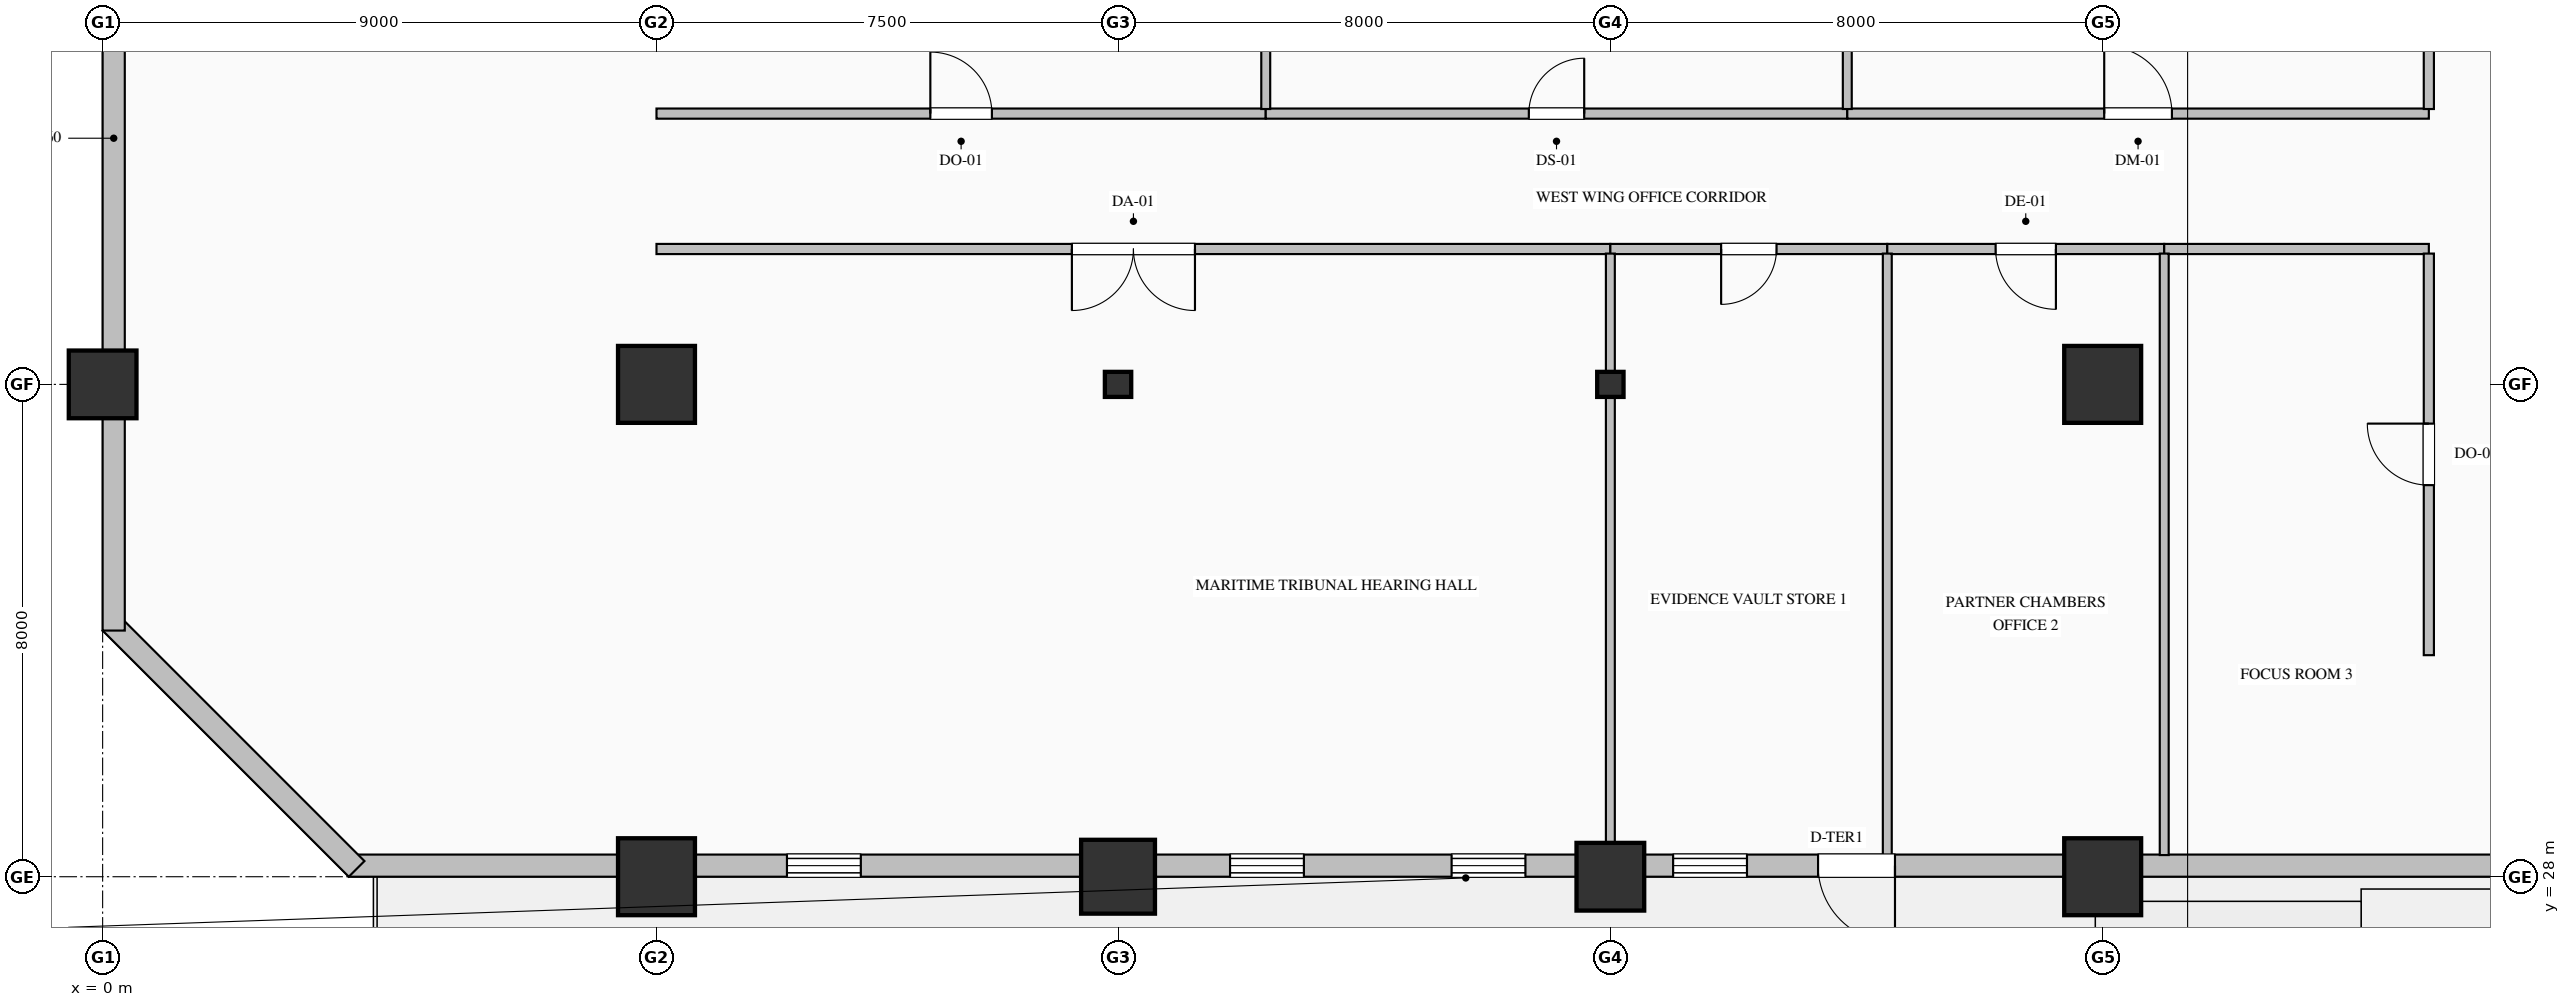
"""IFC4 building model, lengths in metres.
Left out: names, types, materials, properties, quantities, classifications, styles, units other than length and angle.
Written with IfcOpenShell. Run it as: python <this file> out.ifc"""

import sys

from ifc_helpers import new_model, si_unit, direction, frame, frame_2d, origin, origin_2d, place, context, subcontext, project, spatial, rectangle, hollow_rectangle, hollow_circle, i_section, extrude, element, fill, save


model = new_model("IFC4")
c1 = context("Model", 3, precision=1e-05, world=origin(), true_north=direction((0.0, 1.0)))
c2 = subcontext(c1, "Body", "Model", "MODEL_VIEW")
j1 = project(units=[si_unit("LENGTHUNIT", "METRE"), si_unit("PLANEANGLEUNIT", "RADIAN")], contexts=[c1])
p1 = place(None, origin())
s1 = spatial("IfcSite", under=j1, at=p1, CompositionType="ELEMENT")
p2 = place(p1, origin())
s2 = spatial("IfcBuilding", under=s1, at=p2, CompositionType="ELEMENT")
p3 = place(p2, frame((0.0, 0.0, 100.2)))
s3 = spatial("IfcBuildingStorey", under=s2, at=p3, CompositionType="ELEMENT", Elevation=100.2)
p4 = place(p3, frame((0.0, 36.0, 0.0), z_axis=(0.0, 0.0, 1.0), x_axis=(1.0, 0.0, 0.0)))
e1 = element("IfcColumn", 1, at=p4, inside=s3, PredefinedType="COLUMN", context=c2, shape_type="SweptSolid", body=[
    extrude(hollow_rectangle(XDim=1.1, YDim=1.1, WallThickness=0.04, at=origin_2d()), origin(), (0.0, 0.0, 1.0), 4.0),
])
for number, where, z_axis, x_axis in (
    (2, (9.0, 28.0, 0.0), (0.0, 0.0, 1.0), (1.0, 0.0, 0.0)),
    (3, (9.0, 36.0, 0.0), (0.0, 0.0, 1.0), (1.0, 0.0, 0.0)),
):
    element("IfcColumn", number, at=place(p3, frame(where, z_axis=z_axis, x_axis=x_axis)), inside=s3, PredefinedType="COLUMN", context=c2, shape_type="SweptSolid", body=[
        extrude(hollow_rectangle(XDim=1.25, YDim=1.25, WallThickness=0.045, at=origin_2d()), origin(), (0.0, 0.0, 1.0), 4.0),
    ])
p5 = place(p3, frame((16.5, 28.0, 0.0), z_axis=(0.0, 0.0, 1.0), x_axis=(1.0, 0.0, 0.0)))
e4 = element("IfcColumn", 4, at=p5, inside=s3, PredefinedType="COLUMN", context=c2, shape_type="SweptSolid", body=[
    extrude(hollow_circle(Radius=0.6, WallThickness=0.04, at=origin_2d()), origin(), (0.0, 0.0, 1.0), 4.0),
])
p6 = place(p3, frame((16.5, 36.0, 0.0), z_axis=(0.0, 0.0, 1.0), x_axis=(1.0, 0.0, 0.0)))
e5 = element("IfcColumn", 5, at=p6, inside=s3, PredefinedType="COLUMN", context=c2, shape_type="SweptSolid", body=[
    extrude(i_section(OverallWidth=0.407, OverallDepth=0.428, WebThickness=0.02, FlangeThickness=0.035, FilletRadius=0.022, at=origin_2d()), origin(), (0.0, 0.0, 1.0), 4.0),
])
p7 = place(p3, frame((24.5, 28.0, 0.0), z_axis=(0.0, 0.0, 1.0), x_axis=(1.0, 0.0, 0.0)))
e6 = element("IfcColumn", 6, at=p7, inside=s3, PredefinedType="COLUMN", context=c2, shape_type="SweptSolid", body=[
    extrude(hollow_rectangle(XDim=1.1, YDim=1.1, WallThickness=0.04, at=origin_2d()), origin(), (0.0, 0.0, 1.0), 4.0),
])
p8 = place(p3, frame((24.5, 36.0, 0.0), z_axis=(0.0, 0.0, 1.0), x_axis=(1.0, 0.0, 0.0)))
e7 = element("IfcColumn", 7, at=p8, inside=s3, PredefinedType="COLUMN", context=c2, shape_type="SweptSolid", body=[
    extrude(i_section(OverallWidth=0.407, OverallDepth=0.428, WebThickness=0.02, FlangeThickness=0.035, FilletRadius=0.022, at=origin_2d()), origin(), (0.0, 0.0, 1.0), 4.0),
])
for number, where, z_axis, x_axis in (
    (8, (32.5, 28.0, 0.0), (0.0, 0.0, 1.0), (1.0, 0.0, 0.0)),
    (9, (32.5, 36.0, 0.0), (0.0, 0.0, 1.0), (1.0, 0.0, 0.0)),
):
    element("IfcColumn", number, at=place(p3, frame(where, z_axis=z_axis, x_axis=x_axis)), inside=s3, PredefinedType="COLUMN", context=c2, shape_type="SweptSolid", body=[
        extrude(hollow_rectangle(XDim=1.25, YDim=1.25, WallThickness=0.045, at=origin_2d()), origin(), (0.0, 0.0, 1.0), 4.0),
    ])
p9 = place(p3, frame((40.52, 28.18, 0.0), z_axis=(0.0, 0.0, 1.0), x_axis=(-1.0, 0.0, 0.0)))
e10 = element("IfcWall", 10, at=p9, inside=s3, PredefinedType="SOLIDWALL", context=c2, shape_type="SweptSolid", body=[
    extrude(rectangle(XDim=36.52, YDim=0.36, at=frame_2d((18.26, 0.0))), origin(), (0.0, 0.0, 1.0), 3.05),
])
p10 = place(p9, frame((13.8, 0.0, 0.7)))
e11 = element("IfcOpeningElement", 11, at=p10, cuts=e10, PredefinedType="OPENING", context=c2, shape_type="SweptSolid", body=[
    extrude(rectangle(XDim=1.2, YDim=1.85, at=frame_2d((0.6, 0.925))), frame((0.0, 0.19, 0.0), z_axis=(0.0, -1.0, 0.0), x_axis=(1.0, 0.0, 0.0)), (0.0, 0.0, 1.0), 0.38),
])
p11 = place(p9, frame((17.4, 0.0, 0.7)))
e12 = element("IfcOpeningElement", 12, at=p11, cuts=e10, PredefinedType="OPENING", context=c2, shape_type="SweptSolid", body=[
    extrude(rectangle(XDim=1.2, YDim=1.85, at=frame_2d((0.6, 0.925))), frame((0.0, 0.19, 0.0), z_axis=(0.0, -1.0, 0.0), x_axis=(1.0, 0.0, 0.0)), (0.0, 0.0, 1.0), 0.38),
])
p12 = place(p9, frame((21.0, 0.0, 0.7)))
e13 = element("IfcOpeningElement", 13, at=p12, cuts=e10, PredefinedType="OPENING", context=c2, shape_type="SweptSolid", body=[
    extrude(rectangle(XDim=1.2, YDim=1.85, at=frame_2d((0.6, 0.925))), frame((0.0, 0.19, 0.0), z_axis=(0.0, -1.0, 0.0), x_axis=(1.0, 0.0, 0.0)), (0.0, 0.0, 1.0), 0.38),
])
p13 = place(p9, frame((28.2, 0.0, 0.7)))
e14 = element("IfcOpeningElement", 14, at=p13, cuts=e10, PredefinedType="OPENING", context=c2, shape_type="SweptSolid", body=[
    extrude(rectangle(XDim=1.2, YDim=1.85, at=frame_2d((0.6, 0.925))), frame((0.0, 0.19, 0.0), z_axis=(0.0, -1.0, 0.0), x_axis=(1.0, 0.0, 0.0)), (0.0, 0.0, 1.0), 0.38),
])
p14 = place(p9, frame((11.395, 0.0, 0.0)))
e15 = element("IfcOpeningElement", 15, at=p14, cuts=e10, PredefinedType="OPENING", context=c2, shape_type="SweptSolid", body=[
    extrude(rectangle(XDim=1.25, YDim=2.25, at=frame_2d((0.625, 1.125))), frame((0.0, 0.19, 0.0), z_axis=(0.0, -1.0, 0.0), x_axis=(1.0, 0.0, 0.0)), (0.0, 0.0, 1.0), 0.38),
])
p15 = place(p3, frame((4.127, 28.127, 0.0), z_axis=(0.0, 0.0, 1.0), x_axis=(-0.707106781187, 0.707106781187, 0.0)))
e16 = element("IfcWall", 16, at=p15, inside=s3, PredefinedType="SOLIDWALL", context=c2, shape_type="SweptSolid", body=[
    extrude(rectangle(XDim=5.657, YDim=0.36, at=frame_2d((2.828, 0.0))), origin(), (0.0, 0.0, 1.0), 3.75),
])
p16 = place(p3, frame((0.18, 32.0, 0.0), z_axis=(0.0, 0.0, 1.0), x_axis=(0.0, 1.0, 0.0)))
e17 = element("IfcWall", 17, at=p16, inside=s3, PredefinedType="SOLIDWALL", context=c2, shape_type="SweptSolid", body=[
    extrude(rectangle(XDim=16.0, YDim=0.36, at=frame_2d((8.0, 0.0))), origin(), (0.0, 0.0, 1.0), 3.25),
])
p17 = place(p3, frame((9.0, 40.4, 0.0), z_axis=(0.0, 0.0, 1.0), x_axis=(1.0, 0.0, 0.0)))
e18 = element("IfcWall", 18, at=p17, inside=s3, PredefinedType="PARTITIONING", context=c2, shape_type="SweptSolid", body=[
    extrude(rectangle(XDim=9.9, YDim=0.165, at=frame_2d((4.95, 0.0))), origin(), (0.0, 0.0, 1.0), 3.75),
])
p18 = place(p17, frame((4.45, 0.0, 0.0)))
e19 = element("IfcOpeningElement", 19, at=p18, cuts=e18, PredefinedType="OPENING", context=c2, shape_type="SweptSolid", body=[
    extrude(rectangle(XDim=1.0, YDim=2.15, at=frame_2d((0.5, 1.075))), frame((0.0, 0.093, 0.0), z_axis=(0.0, -1.0, 0.0), x_axis=(1.0, 0.0, 0.0)), (0.0, 0.0, 1.0), 0.185),
])
p19 = place(p3, frame((18.9, 40.4, 0.0), z_axis=(0.0, 0.0, 1.0), x_axis=(1.0, 0.0, 0.0)))
e20 = element("IfcWall", 20, at=p19, inside=s3, PredefinedType="PARTITIONING", context=c2, shape_type="SweptSolid", body=[
    extrude(rectangle(XDim=9.45, YDim=0.165, at=frame_2d((4.725, 0.0))), origin(), (0.0, 0.0, 1.0), 3.75),
])
p20 = place(p19, frame((4.275, 0.0, 0.0)))
e21 = element("IfcOpeningElement", 21, at=p20, cuts=e20, PredefinedType="OPENING", context=c2, shape_type="SweptSolid", body=[
    extrude(rectangle(XDim=0.9, YDim=2.15, at=frame_2d((0.45, 1.075))), frame((0.0, 0.093, 0.0), z_axis=(0.0, -1.0, 0.0), x_axis=(1.0, 0.0, 0.0)), (0.0, 0.0, 1.0), 0.185),
])
p21 = place(p3, frame((28.35, 40.4, 0.0), z_axis=(0.0, 0.0, 1.0), x_axis=(1.0, 0.0, 0.0)))
e22 = element("IfcWall", 22, at=p21, inside=s3, PredefinedType="PARTITIONING", context=c2, shape_type="SweptSolid", body=[
    extrude(rectangle(XDim=9.45, YDim=0.165, at=frame_2d((4.725, 0.0))), origin(), (0.0, 0.0, 1.0), 3.75),
])
p22 = place(p21, frame((4.175, 0.0, 0.0)))
e23 = element("IfcOpeningElement", 23, at=p22, cuts=e22, PredefinedType="OPENING", context=c2, shape_type="SweptSolid", body=[
    extrude(rectangle(XDim=1.1, YDim=2.2, at=frame_2d((0.55, 1.1))), frame((0.0, 0.093, 0.0), z_axis=(0.0, -1.0, 0.0), x_axis=(1.0, 0.0, 0.0)), (0.0, 0.0, 1.0), 0.185),
])
p23 = place(p3, frame((24.5, 38.2, 0.0), z_axis=(0.0, 0.0, 1.0), x_axis=(-1.0, 0.0, 0.0)))
e24 = element("IfcWall", 24, at=p23, inside=s3, PredefinedType="PARTITIONING", context=c2, shape_type="SweptSolid", body=[
    extrude(rectangle(XDim=15.5, YDim=0.165, at=frame_2d((7.75, 0.0))), origin(), (0.0, 0.0, 1.0), 3.75),
])
p24 = place(p23, frame((6.75, 0.0, 0.0)))
e25 = element("IfcOpeningElement", 25, at=p24, cuts=e24, PredefinedType="OPENING", context=c2, shape_type="SweptSolid", body=[
    extrude(rectangle(XDim=2.0, YDim=2.4, at=frame_2d((1.0, 1.2))), frame((0.0, 0.093, 0.0), z_axis=(0.0, -1.0, 0.0), x_axis=(1.0, 0.0, 0.0)), (0.0, 0.0, 1.0), 0.185),
])
p25 = place(p3, frame((29.0, 38.2, 0.0), z_axis=(0.0, 0.0, 1.0), x_axis=(-1.0, 0.0, 0.0)))
e26 = element("IfcWall", 26, at=p25, inside=s3, PredefinedType="PARTITIONING", context=c2, shape_type="SweptSolid", body=[
    extrude(rectangle(XDim=4.5, YDim=0.165, at=frame_2d((2.25, 0.0))), origin(), (0.0, 0.0, 1.0), 3.75),
])
p26 = place(p25, frame((1.8, 0.0, 0.0)))
e27 = element("IfcOpeningElement", 27, at=p26, cuts=e26, PredefinedType="OPENING", context=c2, shape_type="SweptSolid", body=[
    extrude(rectangle(XDim=0.9, YDim=2.15, at=frame_2d((0.45, 1.075))), frame((0.0, 0.093, 0.0), z_axis=(0.0, -1.0, 0.0), x_axis=(1.0, 0.0, 0.0)), (0.0, 0.0, 1.0), 0.185),
])
p27 = place(p3, frame((33.5, 38.2, 0.0), z_axis=(0.0, 0.0, 1.0), x_axis=(-1.0, 0.0, 0.0)))
e28 = element("IfcWall", 28, at=p27, inside=s3, PredefinedType="PARTITIONING", context=c2, shape_type="SweptSolid", body=[
    extrude(rectangle(XDim=4.5, YDim=0.165, at=frame_2d((2.25, 0.0))), origin(), (0.0, 0.0, 1.0), 3.75),
])
p28 = place(p27, frame((1.76, 0.0, 0.0)))
e29 = element("IfcOpeningElement", 29, at=p28, cuts=e28, PredefinedType="OPENING", context=c2, shape_type="SweptSolid", body=[
    extrude(rectangle(XDim=0.98, YDim=2.25, at=frame_2d((0.49, 1.125))), frame((0.0, 0.093, 0.0), z_axis=(0.0, -1.0, 0.0), x_axis=(1.0, 0.0, 0.0)), (0.0, 0.0, 1.0), 0.185),
])
p29 = place(p3, frame((37.8, 38.2, 0.0), z_axis=(0.0, 0.0, 1.0), x_axis=(-1.0, 0.0, 0.0)))
e30 = element("IfcWall", 30, at=p29, inside=s3, PredefinedType="PARTITIONING", context=c2, shape_type="SweptSolid", body=[
    extrude(rectangle(XDim=4.3, YDim=0.165, at=frame_2d((2.15, 0.0))), origin(), (0.0, 0.0, 1.0), 3.75),
])
p30 = place(p3, frame((37.8, 40.475, 0.0), z_axis=(0.0, 0.0, 1.0), x_axis=(0.0, 1.0, 0.0)))
e31 = element("IfcWall", 31, at=p30, inside=s3, PredefinedType="PARTITIONING", context=c2, shape_type="SweptSolid", body=[
    extrude(rectangle(XDim=3.651, YDim=0.165, at=frame_2d((1.825, 0.0))), origin(), (0.0, 0.0, 1.0), 3.75),
])
p31 = place(p3, frame((37.8, 31.6, 0.0), z_axis=(0.0, 0.0, 1.0), x_axis=(0.0, 1.0, 0.0)))
e32 = element("IfcWall", 32, at=p31, inside=s3, PredefinedType="PARTITIONING", context=c2, shape_type="SweptSolid", body=[
    extrude(rectangle(XDim=6.525, YDim=0.165, at=frame_2d((3.263, 0.0))), origin(), (0.0, 0.0, 1.0), 3.75),
])
p32 = place(p31, frame((2.763, 0.0, 0.0)))
e33 = element("IfcOpeningElement", 33, at=p32, cuts=e32, PredefinedType="OPENING", context=c2, shape_type="SweptSolid", body=[
    extrude(rectangle(XDim=1.0, YDim=2.15, at=frame_2d((0.5, 1.075))), frame((0.0, 0.093, 0.0), z_axis=(0.0, -1.0, 0.0), x_axis=(1.0, 0.0, 0.0)), (0.0, 0.0, 1.0), 0.185),
])
for number, where, z_axis, x_axis in (
    (34, (18.9, 51.648, 0.0), (0.0, 0.0, 1.0), (0.0, -1.0, 0.0)),
    (35, (28.35, 51.648, 0.0), (0.0, 0.0, 1.0), (0.0, -1.0, 0.0)),
):
    element("IfcWall", number, at=place(p3, frame(where, z_axis=z_axis, x_axis=x_axis)), inside=s3, PredefinedType="PARTITIONING", context=c2, shape_type="SweptSolid", body=[
        extrude(rectangle(XDim=11.173, YDim=0.145, at=frame_2d((5.587, 0.0))), origin(), (0.0, 0.0, 1.0), 3.75),
    ])
p33 = place(p3, frame((24.5, 38.125, 0.0), z_axis=(0.0, 0.0, 1.0), x_axis=(0.0, -1.0, 0.0)))
e36 = element("IfcWall", 36, at=p33, inside=s3, PredefinedType="PARTITIONING", context=c2, shape_type="SweptSolid", body=[
    extrude(rectangle(XDim=9.773, YDim=0.145, at=frame_2d((4.887, 0.0))), origin(), (0.0, 0.0, 1.0), 3.042),
])
for number, where, z_axis, x_axis in (
    (37, (29.0, 38.125, 0.0), (0.0, 0.0, 1.0), (0.0, -1.0, 0.0)),
    (38, (33.5, 38.125, 0.0), (0.0, 0.0, 1.0), (0.0, -1.0, 0.0)),
):
    element("IfcWall", number, at=place(p3, frame(where, z_axis=z_axis, x_axis=x_axis)), inside=s3, PredefinedType="PARTITIONING", context=c2, shape_type="SweptSolid", body=[
        extrude(rectangle(XDim=9.773, YDim=0.145, at=frame_2d((4.887, 0.0))), origin(), (0.0, 0.0, 1.0), 3.75),
    ])
p34 = place(p10, origin())
e39 = element("IfcWindow", 39, at=p34, inside=s3, PartitioningType="DOUBLE_PANEL_VERTICAL", PredefinedType="WINDOW", context=c2, shape_type="SweptSolid", body=[
    extrude(rectangle(XDim=1.2, YDim=1.85, at=frame_2d((0.6, 0.925))), frame((0.0, 0.15, 0.0), z_axis=(0.0, -1.0, 0.0), x_axis=(1.0, 0.0, 0.0)), (0.0, 0.0, 1.0), 0.06),
])
fill(e11, e39)
p35 = place(p11, origin())
e40 = element("IfcWindow", 40, at=p35, inside=s3, PartitioningType="DOUBLE_PANEL_VERTICAL", PredefinedType="WINDOW", context=c2, shape_type="SweptSolid", body=[
    extrude(rectangle(XDim=1.2, YDim=1.85, at=frame_2d((0.6, 0.925))), frame((0.0, 0.15, 0.0), z_axis=(0.0, -1.0, 0.0), x_axis=(1.0, 0.0, 0.0)), (0.0, 0.0, 1.0), 0.06),
])
fill(e12, e40)
p36 = place(p12, origin())
e41 = element("IfcWindow", 41, at=p36, inside=s3, PartitioningType="DOUBLE_PANEL_VERTICAL", PredefinedType="WINDOW", context=c2, shape_type="SweptSolid", body=[
    extrude(rectangle(XDim=1.2, YDim=1.85, at=frame_2d((0.6, 0.925))), frame((0.0, 0.15, 0.0), z_axis=(0.0, -1.0, 0.0), x_axis=(1.0, 0.0, 0.0)), (0.0, 0.0, 1.0), 0.06),
])
fill(e13, e41)
p37 = place(p13, origin())
e42 = element("IfcWindow", 42, at=p37, inside=s3, PartitioningType="DOUBLE_PANEL_VERTICAL", PredefinedType="WINDOW", context=c2, shape_type="SweptSolid", body=[
    extrude(rectangle(XDim=1.2, YDim=1.85, at=frame_2d((0.6, 0.925))), frame((0.0, 0.15, 0.0), z_axis=(0.0, -1.0, 0.0), x_axis=(1.0, 0.0, 0.0)), (0.0, 0.0, 1.0), 0.06),
])
fill(e14, e42)
p38 = place(p14, origin())
e43 = element("IfcDoor", 43, at=p38, inside=s3, OperationType="SINGLE_SWING_LEFT", PredefinedType="DOOR", context=c2, shape_type="SweptSolid", body=[
    extrude(rectangle(XDim=1.25, YDim=2.25, at=frame_2d((0.625, 1.125))), frame((0.0, 0.025, 0.0), z_axis=(0.0, -1.0, 0.0), x_axis=(1.0, 0.0, 0.0)), (0.0, 0.0, 1.0), 0.05),
])
fill(e15, e43)
p39 = place(p18, origin())
e44 = element("IfcDoor", 44, at=p39, inside=s3, OperationType="SINGLE_SWING_LEFT", PredefinedType="DOOR", context=c2, shape_type="SweptSolid", body=[
    extrude(rectangle(XDim=1.0, YDim=2.15, at=frame_2d((0.5, 1.075))), frame((0.0, 0.025, 0.0), z_axis=(0.0, -1.0, 0.0), x_axis=(1.0, 0.0, 0.0)), (0.0, 0.0, 1.0), 0.05),
])
fill(e19, e44)
p40 = place(p20, origin())
e45 = element("IfcDoor", 45, at=p40, inside=s3, OperationType="SINGLE_SWING_RIGHT", PredefinedType="DOOR", context=c2, shape_type="SweptSolid", body=[
    extrude(rectangle(XDim=0.9, YDim=2.15, at=frame_2d((0.45, 1.075))), frame((0.0, 0.025, 0.0), z_axis=(0.0, -1.0, 0.0), x_axis=(1.0, 0.0, 0.0)), (0.0, 0.0, 1.0), 0.05),
])
fill(e21, e45)
p41 = place(p22, origin())
e46 = element("IfcDoor", 46, at=p41, inside=s3, OperationType="SINGLE_SWING_LEFT", PredefinedType="DOOR", context=c2, shape_type="SweptSolid", body=[
    extrude(rectangle(XDim=1.1, YDim=2.2, at=frame_2d((0.55, 1.1))), frame((0.0, 0.025, 0.0), z_axis=(0.0, -1.0, 0.0), x_axis=(1.0, 0.0, 0.0)), (0.0, 0.0, 1.0), 0.05),
])
fill(e23, e46)
p42 = place(p24, origin())
e47 = element("IfcDoor", 47, at=p42, inside=s3, OperationType="DOUBLE_DOOR_SINGLE_SWING", PredefinedType="DOOR", context=c2, shape_type="SweptSolid", body=[
    extrude(rectangle(XDim=2.0, YDim=2.4, at=frame_2d((1.0, 1.2))), frame((0.0, 0.025, 0.0), z_axis=(0.0, -1.0, 0.0), x_axis=(1.0, 0.0, 0.0)), (0.0, 0.0, 1.0), 0.05),
])
fill(e25, e47)
p43 = place(p26, origin())
e48 = element("IfcDoor", 48, at=p43, inside=s3, OperationType="SINGLE_SWING_RIGHT", PredefinedType="DOOR", context=c2, shape_type="SweptSolid", body=[
    extrude(rectangle(XDim=0.9, YDim=2.15, at=frame_2d((0.45, 1.075))), frame((0.0, 0.025, 0.0), z_axis=(0.0, -1.0, 0.0), x_axis=(1.0, 0.0, 0.0)), (0.0, 0.0, 1.0), 0.05),
])
fill(e27, e48)
p44 = place(p28, origin())
e49 = element("IfcDoor", 49, at=p44, inside=s3, OperationType="SINGLE_SWING_LEFT", PredefinedType="DOOR", context=c2, shape_type="SweptSolid", body=[
    extrude(rectangle(XDim=0.98, YDim=2.25, at=frame_2d((0.49, 1.125))), frame((0.0, 0.025, 0.0), z_axis=(0.0, -1.0, 0.0), x_axis=(1.0, 0.0, 0.0)), (0.0, 0.0, 1.0), 0.05),
])
fill(e29, e49)
p45 = place(p32, origin())
e50 = element("IfcDoor", 50, at=p45, inside=s3, OperationType="SINGLE_SWING_RIGHT", PredefinedType="DOOR", context=c2, shape_type="SweptSolid", body=[
    extrude(rectangle(XDim=1.0, YDim=2.15, at=frame_2d((0.5, 1.075))), frame((0.0, 0.025, 0.0), z_axis=(0.0, -1.0, 0.0), x_axis=(1.0, 0.0, 0.0)), (0.0, 0.0, 1.0), 0.05),
])
fill(e33, e50)
save(model, sys.argv[1])
